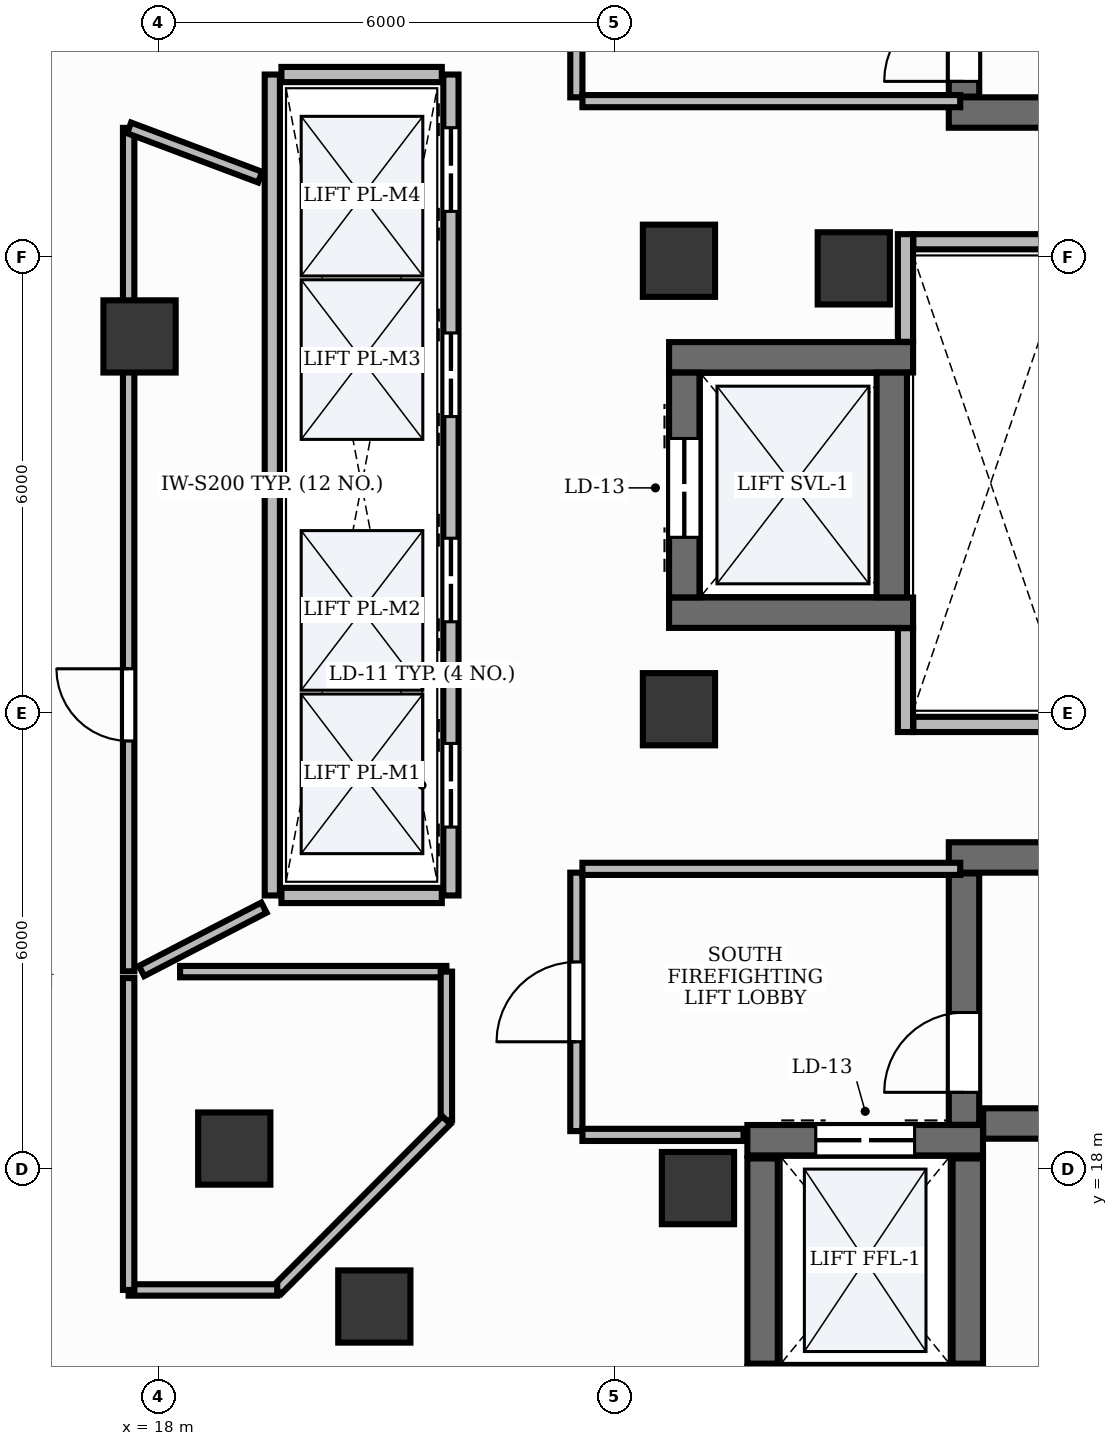
"""IFC4 building model, lengths in metres.
Left out: names, types, materials, properties, quantities, classifications, styles, units other than length and angle.
Written with IfcOpenShell. Run it as: python <this file> out.ifc"""

import sys

from ifc_helpers import new_model, si_unit, direction, frame, frame_2d, origin, origin_2d, place, context, subcontext, project, spatial, rectangle, extrude, element, fill, save


model = new_model("IFC4")
c1 = context("Model", 3, precision=1e-05, world=origin(), true_north=direction((0.0, 1.0)))
c2 = subcontext(c1, "Body", "Model", "MODEL_VIEW")
j1 = project(units=[si_unit("LENGTHUNIT", "METRE"), si_unit("PLANEANGLEUNIT", "RADIAN")], contexts=[c1])
p1 = place(None, origin())
s1 = spatial("IfcSite", under=j1, at=p1, CompositionType="ELEMENT")
p2 = place(p1, origin())
s2 = spatial("IfcBuilding", under=s1, at=p2, CompositionType="ELEMENT")
p3 = place(p2, frame((0.0, 0.0, 183.6)))
s3 = spatial("IfcBuildingStorey", under=s2, at=p3, CompositionType="ELEMENT", Elevation=183.6)
p4 = place(p3, frame((28.4, 31.9, 0.0), z_axis=(0.0, 0.0, 1.0), x_axis=(1.0, 0.0, 0.0)))
e1 = element("IfcWall", 1, at=p4, inside=s3, PredefinedType="SHEAR", context=c2, shape_type="SweptSolid", body=[
    extrude(rectangle(XDim=8.65, YDim=0.4, at=frame_2d((4.325, 0.0))), origin(), (0.0, 0.0, 1.0), 3.9),
])
p5 = place(p3, frame((28.6, 32.11, 0.0), z_axis=(0.0, 0.0, 1.0), x_axis=(0.0, 1.0, 0.0)))
e2 = element("IfcWall", 2, at=p5, inside=s3, PredefinedType="SHEAR", context=c2, shape_type="SweptSolid", body=[
    extrude(rectangle(XDim=3.308, YDim=0.4, at=frame_2d((1.654, 0.0))), origin(), (0.0, 0.0, 1.0), 3.9),
])
p6 = place(p5, frame((0.2, 0.0, 0.0)))
e3 = element("IfcOpeningElement", 3, at=p6, cuts=e2, PredefinedType="OPENING", context=c2, shape_type="SweptSolid", body=[
    extrude(rectangle(XDim=1.05, YDim=2.15, at=frame_2d((0.525, 1.075))), frame((0.0, 0.215, 0.0), z_axis=(0.0, -1.0, 0.0), x_axis=(1.0, 0.0, 0.0)), (0.0, 0.0, 1.0), 0.43),
])
p7 = place(p3, frame((28.852, 18.6, 0.0), z_axis=(0.0, 0.0, 1.0), x_axis=(1.0, 0.0, 0.0)))
e4 = element("IfcWall", 4, at=p7, inside=s3, PredefinedType="SHEAR", context=c2, shape_type="SweptSolid", body=[
    extrude(rectangle(XDim=8.198, YDim=0.4, at=frame_2d((4.099, 0.0))), origin(), (0.0, 0.0, 1.0), 3.9),
])
p8 = place(p3, frame((28.4, 22.1, 0.0), z_axis=(0.0, 0.0, 1.0), x_axis=(1.0, 0.0, 0.0)))
e5 = element("IfcWall", 5, at=p8, inside=s3, PredefinedType="SHEAR", context=c2, shape_type="SweptSolid", body=[
    extrude(rectangle(XDim=8.65, YDim=0.4, at=frame_2d((4.325, 0.0))), origin(), (0.0, 0.0, 1.0), 3.9),
])
p9 = place(p3, frame((28.6, 18.582, 0.0), z_axis=(0.0, 0.0, 1.0), x_axis=(0.0, 1.0, 0.0)))
e6 = element("IfcWall", 6, at=p9, inside=s3, PredefinedType="SHEAR", context=c2, shape_type="SweptSolid", body=[
    extrude(rectangle(XDim=3.308, YDim=0.4, at=frame_2d((1.654, 0.0))), origin(), (0.0, 0.0, 1.0), 3.9),
])
p10 = place(p9, frame((0.428, 0.0, 0.0)))
e7 = element("IfcOpeningElement", 7, at=p10, cuts=e6, PredefinedType="OPENING", context=c2, shape_type="SweptSolid", body=[
    extrude(rectangle(XDim=1.05, YDim=2.15, at=frame_2d((0.525, 1.075))), frame((0.0, 0.215, 0.0), z_axis=(0.0, -1.0, 0.0), x_axis=(1.0, 0.0, 0.0)), (0.0, 0.0, 1.0), 0.43),
])
p11 = place(p3, frame((25.75, 18.38, 0.0), z_axis=(0.0, 0.0, 1.0), x_axis=(1.0, 0.0, 0.0)))
e8 = element("IfcWall", 8, at=p11, inside=s3, PredefinedType="SHEAR", context=c2, shape_type="SweptSolid", body=[
    extrude(rectangle(XDim=3.1, YDim=0.4, at=frame_2d((1.55, 0.0))), origin(), (0.0, 0.0, 1.0), 3.9),
])
p12 = place(p11, frame((0.9, 0.0, 0.0)))
e9 = element("IfcOpeningElement", 9, at=p12, cuts=e8, PredefinedType="OPENING", context=c2, shape_type="SweptSolid", body=[
    extrude(rectangle(XDim=1.3, YDim=2.2, at=frame_2d((0.65, 1.1))), frame((0.0, 0.215, 0.0), z_axis=(0.0, -1.0, 0.0), x_axis=(1.0, 0.0, 0.0)), (0.0, 0.0, 1.0), 0.43),
])
for number, where, z_axis, x_axis in (
    (10, (25.95, 15.44, 0.0), (0.0, 0.0, 1.0), (0.0, 1.0, 0.0)),
    (11, (28.65, 15.44, 0.0), (0.0, 0.0, 1.0), (0.0, 1.0, 0.0)),
):
    element("IfcWall", number, at=place(p3, frame(where, z_axis=z_axis, x_axis=x_axis)), inside=s3, PredefinedType="SHEAR", context=c2, shape_type="SweptSolid", body=[
        extrude(rectangle(XDim=2.7, YDim=0.4, at=frame_2d((1.35, 0.0))), origin(), (0.0, 0.0, 1.0), 3.9),
    ])
for number, where, z_axis, x_axis in (
    (12, (24.72, 28.68, 0.0), (0.0, 0.0, 1.0), (1.0, 0.0, 0.0)),
    (13, (24.72, 25.32, 0.0), (0.0, 0.0, 1.0), (1.0, 0.0, 0.0)),
):
    element("IfcWall", number, at=place(p3, frame(where, z_axis=z_axis, x_axis=x_axis)), inside=s3, PredefinedType="SHEAR", context=c2, shape_type="SweptSolid", body=[
        extrude(rectangle(XDim=3.21, YDim=0.4, at=frame_2d((1.605, 0.0))), origin(), (0.0, 0.0, 1.0), 3.9),
    ])
p13 = place(p3, frame((24.92, 25.522, 0.0), z_axis=(0.0, 0.0, 1.0), x_axis=(0.0, 1.0, 0.0)))
e14 = element("IfcWall", 14, at=p13, inside=s3, PredefinedType="SHEAR", context=c2, shape_type="SweptSolid", body=[
    extrude(rectangle(XDim=2.956, YDim=0.4, at=frame_2d((1.478, 0.0))), origin(), (0.0, 0.0, 1.0), 3.9),
])
p14 = place(p13, frame((0.79, 0.0, 0.0)))
e15 = element("IfcOpeningElement", 15, at=p14, cuts=e14, PredefinedType="OPENING", context=c2, shape_type="SweptSolid", body=[
    extrude(rectangle(XDim=1.3, YDim=2.2, at=frame_2d((0.65, 1.1))), frame((0.0, 0.215, 0.0), z_axis=(0.0, -1.0, 0.0), x_axis=(1.0, 0.0, 0.0)), (0.0, 0.0, 1.0), 0.43),
])
p15 = place(p3, frame((27.65, 25.522, 0.0), z_axis=(0.0, 0.0, 1.0), x_axis=(0.0, 1.0, 0.0)))
e16 = element("IfcWall", 16, at=p15, inside=s3, PredefinedType="SHEAR", context=c2, shape_type="SweptSolid", body=[
    extrude(rectangle(XDim=2.956, YDim=0.4, at=frame_2d((1.478, 0.0))), origin(), (0.0, 0.0, 1.0), 3.9),
])
for number, where, z_axis, x_axis in (
    (17, (24.85, 29.95, -0.0), (0.0, 0.0, 1.0), (1.0, 0.0, 0.0)),
    (18, (27.15, 29.85, -0.0), (0.0, 0.0, 1.0), (1.0, 0.0, 0.0)),
    (19, (24.85, 24.05, -0.0), (0.0, 0.0, 1.0), (1.0, 0.0, 0.0)),
    (20, (25.1, 17.75, -0.0), (0.0, 0.0, 1.0), (1.0, 0.0, 0.0)),
):
    element("IfcColumn", number, at=place(p3, frame(where, z_axis=z_axis, x_axis=x_axis)), inside=s3, PredefinedType="PILASTER", context=c2, shape_type="SweptSolid", body=[
        extrude(rectangle(XDim=0.95, YDim=0.95, at=origin_2d()), origin(), (0.0, 0.0, 1.0), 3.901),
    ])
for number, where, z_axis, x_axis in (
    (21, (17.753, 28.955, -0.0), (0.0, 0.0, 1.0), (1.0, 0.0, 0.0)),
    (22, (19.0, 18.27, -0.0), (0.0, 0.0, 1.0), (1.0, 0.0, 0.0)),
    (23, (20.842, 16.192, -0.0), (0.0, 0.0, 1.0), (1.0, 0.0, 0.0)),
):
    element("IfcColumn", number, at=place(p3, frame(where, z_axis=z_axis, x_axis=x_axis)), inside=s3, PredefinedType="COLUMN", context=c2, shape_type="SweptSolid", body=[
        extrude(rectangle(XDim=0.95, YDim=0.95, at=origin_2d()), origin(), (0.0, 0.0, 1.0), 3.901),
    ])
p16 = place(p3, frame((19.5, 21.6, 0.0), z_axis=(0.0, 0.0, 1.0), x_axis=(0.0, 1.0, 0.0)))
e24 = element("IfcWall", 24, at=p16, inside=s3, PredefinedType="PARTITIONING", context=c2, shape_type="SweptSolid", body=[
    extrude(rectangle(XDim=10.8, YDim=0.2, at=frame_2d((5.4, 0.0))), origin(), (0.0, 0.0, 1.0), 2.91),
])
p17 = place(p3, frame((21.85, 21.6, 0.0), z_axis=(0.0, 0.0, 1.0), x_axis=(0.0, 1.0, 0.0)))
e25 = element("IfcWall", 25, at=p17, inside=s3, PredefinedType="PARTITIONING", context=c2, shape_type="SweptSolid", body=[
    extrude(rectangle(XDim=10.8, YDim=0.2, at=frame_2d((5.4, 0.0))), origin(), (0.0, 0.0, 1.0), 2.91),
])
p18 = place(p17, frame((0.9, 0.0, 0.0)))
e26 = element("IfcOpeningElement", 26, at=p18, cuts=e25, PredefinedType="OPENING", context=c2, shape_type="SweptSolid", body=[
    extrude(rectangle(XDim=1.1, YDim=2.2, at=frame_2d((0.55, 1.1))), frame((0.0, 0.115, 0.0), z_axis=(0.0, -1.0, 0.0), x_axis=(1.0, 0.0, 0.0)), (0.0, 0.0, 1.0), 0.23),
])
p19 = place(p17, frame((3.6, 0.0, 0.0)))
e27 = element("IfcOpeningElement", 27, at=p19, cuts=e25, PredefinedType="OPENING", context=c2, shape_type="SweptSolid", body=[
    extrude(rectangle(XDim=1.1, YDim=2.2, at=frame_2d((0.55, 1.1))), frame((0.0, 0.115, 0.0), z_axis=(0.0, -1.0, 0.0), x_axis=(1.0, 0.0, 0.0)), (0.0, 0.0, 1.0), 0.23),
])
p20 = place(p17, frame((6.3, 0.0, 0.0)))
e28 = element("IfcOpeningElement", 28, at=p20, cuts=e25, PredefinedType="OPENING", context=c2, shape_type="SweptSolid", body=[
    extrude(rectangle(XDim=1.1, YDim=2.2, at=frame_2d((0.55, 1.1))), frame((0.0, 0.115, 0.0), z_axis=(0.0, -1.0, 0.0), x_axis=(1.0, 0.0, 0.0)), (0.0, 0.0, 1.0), 0.23),
])
p21 = place(p17, frame((9.0, 0.0, 0.0)))
e29 = element("IfcOpeningElement", 29, at=p21, cuts=e25, PredefinedType="OPENING", context=c2, shape_type="SweptSolid", body=[
    extrude(rectangle(XDim=1.1, YDim=2.2, at=frame_2d((0.55, 1.1))), frame((0.0, 0.115, 0.0), z_axis=(0.0, -1.0, 0.0), x_axis=(1.0, 0.0, 0.0)), (0.0, 0.0, 1.0), 0.23),
])
for number, where, z_axis, x_axis in (
    (30, (19.62, 21.6, 0.0), (0.0, 0.0, 1.0), (1.0, 0.0, 0.0)),
    (31, (19.62, 32.4, 0.0), (0.0, 0.0, 1.0), (1.0, 0.0, 0.0)),
):
    element("IfcWall", number, at=place(p3, frame(where, z_axis=z_axis, x_axis=x_axis)), inside=s3, PredefinedType="PARTITIONING", context=c2, shape_type="SweptSolid", body=[
        extrude(rectangle(XDim=2.11, YDim=0.2, at=frame_2d((1.055, 0.0))), origin(), (0.0, 0.0, 1.0), 2.91),
    ])
p22 = place(p3, frame((27.83, 23.75, 0.0), z_axis=(0.0, 0.0, 1.0), x_axis=(0.0, 1.0, 0.0)))
e32 = element("IfcWall", 32, at=p22, inside=s3, PredefinedType="PARTITIONING", context=c2, shape_type="SweptSolid", body=[
    extrude(rectangle(XDim=1.366, YDim=0.2, at=frame_2d((0.683, 0.0))), origin(), (0.0, 0.0, 1.0), 2.91),
])
p23 = place(p3, frame((27.83, 28.884, 0.0), z_axis=(0.0, 0.0, 1.0), x_axis=(0.0, 1.0, 0.0)))
e33 = element("IfcWall", 33, at=p23, inside=s3, PredefinedType="PARTITIONING", context=c2, shape_type="SweptSolid", body=[
    extrude(rectangle(XDim=1.416, YDim=0.2, at=frame_2d((0.708, 0.0))), origin(), (0.0, 0.0, 1.0), 2.91),
])
for number, where, z_axis, x_axis in (
    (34, (27.934, 23.85, 0.0), (0.0, 0.0, 1.0), (1.0, 0.0, 0.0)),
    (35, (27.934, 30.2, 0.0), (0.0, 0.0, 1.0), (1.0, 0.0, 0.0)),
):
    element("IfcWall", number, at=place(p3, frame(where, z_axis=z_axis, x_axis=x_axis)), inside=s3, PredefinedType="PARTITIONING", context=c2, shape_type="SweptSolid", body=[
        extrude(rectangle(XDim=2.096, YDim=0.2, at=frame_2d((1.048, 0.0))), origin(), (0.0, 0.0, 1.0), 2.91),
    ])
p24 = place(p3, frame((23.5, 32.1, 0.0), z_axis=(0.0, 0.0, 1.0), x_axis=(0.0, 1.0, 0.0)))
e36 = element("IfcWall", 36, at=p24, inside=s3, PredefinedType="PARTITIONING", context=c2, shape_type="SweptSolid", body=[
    extrude(rectangle(XDim=3.4, YDim=0.16, at=frame_2d((1.7, 0.0))), origin(), (0.0, 0.0, 1.0), 2.91),
])
p25 = place(p24, frame((1.175, 0.0, 0.0)))
e37 = element("IfcOpeningElement", 37, at=p25, cuts=e36, PredefinedType="OPENING", context=c2, shape_type="SweptSolid", body=[
    extrude(rectangle(XDim=1.05, YDim=2.15, at=frame_2d((0.525, 1.075))), frame((0.0, 0.095, 0.0), z_axis=(0.0, -1.0, 0.0), x_axis=(1.0, 0.0, 0.0)), (0.0, 0.0, 1.0), 0.19),
])
p26 = place(p3, frame((23.5, 18.5, 0.0), z_axis=(0.0, 0.0, 1.0), x_axis=(0.0, 1.0, 0.0)))
e38 = element("IfcWall", 38, at=p26, inside=s3, PredefinedType="PARTITIONING", context=c2, shape_type="SweptSolid", body=[
    extrude(rectangle(XDim=3.4, YDim=0.16, at=frame_2d((1.7, 0.0))), origin(), (0.0, 0.0, 1.0), 2.91),
])
p27 = place(p26, frame((1.175, 0.0, 0.0)))
e39 = element("IfcOpeningElement", 39, at=p27, cuts=e38, PredefinedType="OPENING", context=c2, shape_type="SweptSolid", body=[
    extrude(rectangle(XDim=1.05, YDim=2.15, at=frame_2d((0.525, 1.075))), frame((0.0, 0.095, 0.0), z_axis=(0.0, -1.0, 0.0), x_axis=(1.0, 0.0, 0.0)), (0.0, 0.0, 1.0), 0.19),
])
for number, where, z_axis, x_axis in (
    (40, (23.58, 32.05, 0.0), (0.0, 0.0, 1.0), (1.0, 0.0, 0.0)),
    (41, (23.58, 21.95, 0.0), (0.0, 0.0, 1.0), (1.0, 0.0, 0.0)),
):
    element("IfcWall", number, at=place(p3, frame(where, z_axis=z_axis, x_axis=x_axis)), inside=s3, PredefinedType="PARTITIONING", context=c2, shape_type="SweptSolid", body=[
        extrude(rectangle(XDim=4.97, YDim=0.16, at=frame_2d((2.485, 0.0))), origin(), (0.0, 0.0, 1.0), 2.91),
    ])
p28 = place(p3, frame((23.58, 18.45, 0.0), z_axis=(0.0, 0.0, 1.0), x_axis=(1.0, 0.0, 0.0)))
e42 = element("IfcWall", 42, at=p28, inside=s3, PredefinedType="PARTITIONING", context=c2, shape_type="SweptSolid", body=[
    extrude(rectangle(XDim=2.12, YDim=0.16, at=frame_2d((1.06, 0.0))), origin(), (0.0, 0.0, 1.0), 2.91),
])
p29 = place(p3, frame((17.61, 20.602, 0.0), z_axis=(0.0, 0.0, 1.0), x_axis=(0.0, 1.0, 0.0)))
e43 = element("IfcWall", 43, at=p29, inside=s3, PredefinedType="PARTITIONING", context=c2, shape_type="SweptSolid", body=[
    extrude(rectangle(XDim=11.096, YDim=0.15, at=frame_2d((5.548, 0.0))), origin(), (0.0, 0.0, 1.0), 2.91),
])
p30 = place(p29, frame((3.03, 0.0, 0.0)))
e44 = element("IfcOpeningElement", 44, at=p30, cuts=e43, PredefinedType="OPENING", context=c2, shape_type="SweptSolid", body=[
    extrude(rectangle(XDim=0.95, YDim=2.15, at=frame_2d((0.475, 1.075))), frame((0.0, 0.09, 0.0), z_axis=(0.0, -1.0, 0.0), x_axis=(1.0, 0.0, 0.0)), (0.0, 0.0, 1.0), 0.18),
])
p31 = place(p3, frame((17.616, 31.698, 0.0), z_axis=(0.0, 0.0, 1.0), x_axis=(0.936061955156, -0.351835211583, 0.0)))
e45 = element("IfcWall", 45, at=p31, inside=s3, PredefinedType="PARTITIONING", context=c2, shape_type="SweptSolid", body=[
    extrude(rectangle(XDim=1.842, YDim=0.15, at=frame_2d((0.921, 0.0))), origin(), (0.0, 0.0, 1.0), 2.91),
])
p32 = place(p3, frame((19.39, 21.44, 0.0), z_axis=(0.0, 0.0, 1.0), x_axis=(-0.887870664605, -0.460093124197, 0.0)))
e46 = element("IfcWall", 46, at=p32, inside=s3, PredefinedType="PARTITIONING", context=c2, shape_type="SweptSolid", body=[
    extrude(rectangle(XDim=1.813, YDim=0.15, at=frame_2d((0.907, 0.0))), origin(), (0.0, 0.0, 1.0), 2.91),
])
p33 = place(p3, frame((18.287, 20.598, 0.0), z_axis=(0.0, 0.0, 1.0), x_axis=(1.0, 0.0, 0.0)))
e47 = element("IfcWall", 47, at=p33, inside=s3, PredefinedType="PARTITIONING", context=c2, shape_type="SweptSolid", body=[
    extrude(rectangle(XDim=3.503, YDim=0.15, at=frame_2d((1.751, 0.0))), origin(), (0.0, 0.0, 1.0), 2.91),
])
p34 = place(p3, frame((21.79, 20.598, 0.0), z_axis=(0.0, 0.0, 1.0), x_axis=(0.0, -1.0, 0.0)))
e48 = element("IfcWall", 48, at=p34, inside=s3, PredefinedType="PARTITIONING", context=c2, shape_type="SweptSolid", body=[
    extrude(rectangle(XDim=1.955, YDim=0.15, at=frame_2d((0.977, 0.0))), origin(), (0.0, 0.0, 1.0), 2.91),
])
p35 = place(p3, frame((21.79, 18.643, 0.0), z_axis=(0.0, 0.0, 1.0), x_axis=(-0.705866789687, -0.708344602024, 0.0)))
e49 = element("IfcWall", 49, at=p35, inside=s3, PredefinedType="PARTITIONING", context=c2, shape_type="SweptSolid", body=[
    extrude(rectangle(XDim=3.153, YDim=0.15, at=frame_2d((1.577, 0.0))), origin(), (0.0, 0.0, 1.0), 2.91),
])
p36 = place(p3, frame((19.564, 16.41, 0.0), z_axis=(0.0, 0.0, 1.0), x_axis=(-1.0, 0.0, 0.0)))
e50 = element("IfcWall", 50, at=p36, inside=s3, PredefinedType="PARTITIONING", context=c2, shape_type="SweptSolid", body=[
    extrude(rectangle(XDim=1.954, YDim=0.15, at=frame_2d((0.977, 0.0))), origin(), (0.0, 0.0, 1.0), 2.91),
])
p37 = place(p3, frame((17.61, 16.41, 0.0), z_axis=(0.0, 0.0, 1.0), x_axis=(0.0, 1.0, 0.0)))
e51 = element("IfcWall", 51, at=p37, inside=s3, PredefinedType="PARTITIONING", context=c2, shape_type="SweptSolid", body=[
    extrude(rectangle(XDim=4.103, YDim=0.15, at=frame_2d((2.052, 0.0))), origin(), (0.0, 0.0, 1.0), 2.91),
])
p38 = place(p6, origin())
e52 = element("IfcDoor", 52, at=p38, inside=s3, OperationType="SINGLE_SWING_LEFT", PredefinedType="DOOR", context=c2, shape_type="SweptSolid", body=[
    extrude(rectangle(XDim=1.05, YDim=2.15, at=frame_2d((0.525, 1.075))), frame((0.0, 0.025, 0.0), z_axis=(0.0, -1.0, 0.0), x_axis=(1.0, 0.0, 0.0)), (0.0, 0.0, 1.0), 0.05),
])
fill(e3, e52)
p39 = place(p10, origin())
e53 = element("IfcDoor", 53, at=p39, inside=s3, OperationType="SINGLE_SWING_LEFT", PredefinedType="DOOR", context=c2, shape_type="SweptSolid", body=[
    extrude(rectangle(XDim=1.05, YDim=2.15, at=frame_2d((0.525, 1.075))), frame((0.0, 0.025, 0.0), z_axis=(0.0, -1.0, 0.0), x_axis=(1.0, 0.0, 0.0)), (0.0, 0.0, 1.0), 0.05),
])
fill(e7, e53)
p40 = place(p18, origin())
e54 = element("IfcDoor", 54, at=p40, inside=s3, OperationType="DOUBLE_DOOR_SLIDING", PredefinedType="DOOR", context=c2, shape_type="SweptSolid", body=[
    extrude(rectangle(XDim=1.1, YDim=2.2, at=frame_2d((0.55, 1.1))), frame((0.0, 0.025, 0.0), z_axis=(0.0, -1.0, 0.0), x_axis=(1.0, 0.0, 0.0)), (0.0, 0.0, 1.0), 0.05),
])
fill(e26, e54)
p41 = place(p19, origin())
e55 = element("IfcDoor", 55, at=p41, inside=s3, OperationType="DOUBLE_DOOR_SLIDING", PredefinedType="DOOR", context=c2, shape_type="SweptSolid", body=[
    extrude(rectangle(XDim=1.1, YDim=2.2, at=frame_2d((0.55, 1.1))), frame((0.0, 0.025, 0.0), z_axis=(0.0, -1.0, 0.0), x_axis=(1.0, 0.0, 0.0)), (0.0, 0.0, 1.0), 0.05),
])
fill(e27, e55)
p42 = place(p20, origin())
e56 = element("IfcDoor", 56, at=p42, inside=s3, OperationType="DOUBLE_DOOR_SLIDING", PredefinedType="DOOR", context=c2, shape_type="SweptSolid", body=[
    extrude(rectangle(XDim=1.1, YDim=2.2, at=frame_2d((0.55, 1.1))), frame((0.0, 0.025, 0.0), z_axis=(0.0, -1.0, 0.0), x_axis=(1.0, 0.0, 0.0)), (0.0, 0.0, 1.0), 0.05),
])
fill(e28, e56)
p43 = place(p21, origin())
e57 = element("IfcDoor", 57, at=p43, inside=s3, OperationType="DOUBLE_DOOR_SLIDING", PredefinedType="DOOR", context=c2, shape_type="SweptSolid", body=[
    extrude(rectangle(XDim=1.1, YDim=2.2, at=frame_2d((0.55, 1.1))), frame((0.0, 0.025, 0.0), z_axis=(0.0, -1.0, 0.0), x_axis=(1.0, 0.0, 0.0)), (0.0, 0.0, 1.0), 0.05),
])
fill(e29, e57)
p44 = place(p12, origin())
e58 = element("IfcDoor", 58, at=p44, inside=s3, OperationType="DOUBLE_DOOR_SLIDING", PredefinedType="DOOR", context=c2, shape_type="SweptSolid", body=[
    extrude(rectangle(XDim=1.3, YDim=2.2, at=frame_2d((0.65, 1.1))), frame((0.0, 0.025, 0.0), z_axis=(0.0, -1.0, 0.0), x_axis=(1.0, 0.0, 0.0)), (0.0, 0.0, 1.0), 0.05),
])
fill(e9, e58)
p45 = place(p14, origin())
e59 = element("IfcDoor", 59, at=p45, inside=s3, OperationType="DOUBLE_DOOR_SLIDING", PredefinedType="DOOR", context=c2, shape_type="SweptSolid", body=[
    extrude(rectangle(XDim=1.3, YDim=2.2, at=frame_2d((0.65, 1.1))), frame((0.0, 0.025, 0.0), z_axis=(0.0, -1.0, 0.0), x_axis=(1.0, 0.0, 0.0)), (0.0, 0.0, 1.0), 0.05),
])
fill(e15, e59)
p46 = place(p27, origin())
e60 = element("IfcDoor", 60, at=p46, inside=s3, OperationType="SINGLE_SWING_LEFT", PredefinedType="DOOR", context=c2, shape_type="SweptSolid", body=[
    extrude(rectangle(XDim=1.05, YDim=2.15, at=frame_2d((0.525, 1.075))), frame((0.0, 0.025, 0.0), z_axis=(0.0, -1.0, 0.0), x_axis=(1.0, 0.0, 0.0)), (0.0, 0.0, 1.0), 0.05),
])
fill(e39, e60)
p47 = place(p30, origin())
e61 = element("IfcDoor", 61, at=p47, inside=s3, OperationType="SINGLE_SWING_RIGHT", PredefinedType="DOOR", context=c2, shape_type="SweptSolid", body=[
    extrude(rectangle(XDim=0.95, YDim=2.15, at=frame_2d((0.475, 1.075))), frame((0.0, 0.025, 0.0), z_axis=(0.0, -1.0, 0.0), x_axis=(1.0, 0.0, 0.0)), (0.0, 0.0, 1.0), 0.05),
])
fill(e44, e61)
save(model, sys.argv[1])
